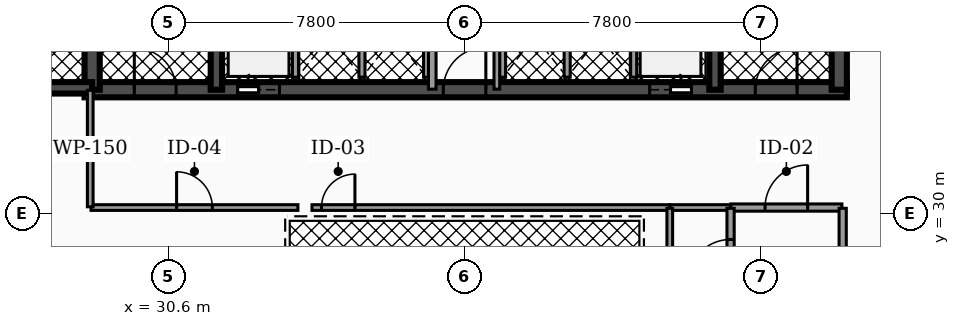
"""IFC4 building model, lengths in metres.
Left out: names, types, materials, properties, quantities, classifications, styles, units other than length and angle.
Written with IfcOpenShell. Run it as: python <this file> out.ifc"""

import sys

from ifc_helpers import new_model, si_unit, direction, frame, frame_2d, origin, place, context, subcontext, project, spatial, rectangle, extrude, element, fill, save


model = new_model("IFC4")
c1 = context("Model", 3, precision=1e-05, world=origin(), true_north=direction((0.0, 1.0)))
c2 = subcontext(c1, "Body", "Model", "MODEL_VIEW")
j1 = project(units=[si_unit("LENGTHUNIT", "METRE"), si_unit("PLANEANGLEUNIT", "RADIAN")], contexts=[c1])
p1 = place(None, origin())
s1 = spatial("IfcSite", under=j1, at=p1, CompositionType="ELEMENT")
p2 = place(p1, origin())
s2 = spatial("IfcBuilding", under=s1, at=p2, CompositionType="ELEMENT")
p3 = place(p2, frame((0.0, 0.0, 84.66)))
s3 = spatial("IfcBuildingStorey", under=s2, at=p3, CompositionType="ELEMENT", Elevation=84.66)
p4 = place(p3, frame((28.4, 33.25, 0.0), z_axis=(0.0, 0.0, 1.0), x_axis=(1.0, 0.0, 0.0)))
e1 = element("IfcWall", 1, at=p4, inside=s3, PredefinedType="SHEAR", context=c2, shape_type="SweptSolid", body=[
    extrude(rectangle(XDim=20.06, YDim=0.4, at=frame_2d((10.03, 0.0))), origin(), (0.0, 0.0, 1.0), 3.82),
])
p5 = place(p4, frame((4.03, 0.0, 0.0)))
e2 = element("IfcOpeningElement", 2, at=p5, cuts=e1, PredefinedType="OPENING", context=c2, shape_type="SweptSolid", body=[
    extrude(rectangle(XDim=1.1, YDim=2.15, at=frame_2d((0.55, 1.075))), frame((0.0, 0.21, 0.0), z_axis=(0.0, -1.0, 0.0), x_axis=(1.0, 0.0, 0.0)), (0.0, 0.0, 1.0), 0.42),
])
p6 = place(p4, frame((14.87, 0.0, 0.0)))
e3 = element("IfcOpeningElement", 3, at=p6, cuts=e1, PredefinedType="OPENING", context=c2, shape_type="SweptSolid", body=[
    extrude(rectangle(XDim=1.1, YDim=2.15, at=frame_2d((0.55, 1.075))), frame((0.0, 0.21, 0.0), z_axis=(0.0, -1.0, 0.0), x_axis=(1.0, 0.0, 0.0)), (0.0, 0.0, 1.0), 0.42),
])
p7 = place(p4, frame((1.31, 0.0, 0.0)))
e4 = element("IfcOpeningElement", 4, at=p7, cuts=e1, PredefinedType="OPENING", context=c2, shape_type="SweptSolid", body=[
    extrude(rectangle(XDim=1.1, YDim=2.2, at=frame_2d((0.55, 1.1))), frame((0.0, 0.21, 0.0), z_axis=(0.0, -1.0, 0.0), x_axis=(1.0, 0.0, 0.0)), (0.0, 0.0, 1.0), 0.42),
])
p8 = place(p4, frame((9.44, 0.0, 0.0)))
e5 = element("IfcOpeningElement", 5, at=p8, cuts=e1, PredefinedType="OPENING", context=c2, shape_type="SweptSolid", body=[
    extrude(rectangle(XDim=1.12, YDim=2.05, at=frame_2d((0.56, 1.025))), frame((0.0, 0.21, 0.0), z_axis=(0.0, -1.0, 0.0), x_axis=(1.0, 0.0, 0.0)), (0.0, 0.0, 1.0), 0.42),
])
p9 = place(p4, frame((17.65, 0.0, 0.0)))
e6 = element("IfcOpeningElement", 6, at=p9, cuts=e1, PredefinedType="OPENING", context=c2, shape_type="SweptSolid", body=[
    extrude(rectangle(XDim=1.1, YDim=2.2, at=frame_2d((0.55, 1.1))), frame((0.0, 0.21, 0.0), z_axis=(0.0, -1.0, 0.0), x_axis=(1.0, 0.0, 0.0)), (0.0, 0.0, 1.0), 0.42),
])
p10 = place(p3, frame((28.6, 33.25, 0.0), z_axis=(0.0, 0.0, 1.0), x_axis=(0.0, 1.0, 0.0)))
e7 = element("IfcWall", 7, at=p10, inside=s3, PredefinedType="SHEAR", context=c2, shape_type="SweptSolid", body=[
    extrude(rectangle(XDim=10.2, YDim=0.4, at=frame_2d((5.1, 0.0))), origin(), (0.0, 0.0, 1.0), 3.82),
])
for number, where, z_axis, x_axis in (
    (8, (31.87, 33.25, 0.0), (0.0, 0.0, 1.0), (0.0, 1.0, 0.0)),
    (9, (44.99, 33.25, 0.0), (0.0, 0.0, 1.0), (0.0, 1.0, 0.0)),
):
    element("IfcWall", number, at=place(p3, frame(where, z_axis=z_axis, x_axis=x_axis)), inside=s3, PredefinedType="SHEAR", context=c2, shape_type="SweptSolid", body=[
        extrude(rectangle(XDim=10.2, YDim=0.3, at=frame_2d((5.1, 0.0))), origin(), (0.0, 0.0, 1.0), 3.82),
    ])
p11 = place(p3, frame((48.26, 33.25, 0.0), z_axis=(0.0, 0.0, 1.0), x_axis=(0.0, 1.0, 0.0)))
e10 = element("IfcWall", 10, at=p11, inside=s3, PredefinedType="SHEAR", context=c2, shape_type="SweptSolid", body=[
    extrude(rectangle(XDim=10.2, YDim=0.4, at=frame_2d((5.1, 0.0))), origin(), (0.0, 0.0, 1.0), 3.82),
])
p12 = place(p3, frame((25.08, 33.3, 0.0), z_axis=(0.0, 0.0, 1.0), x_axis=(1.0, 0.0, 0.0)))
e11 = element("IfcWall", 11, at=p12, inside=s3, PredefinedType="SHEAR", context=c2, shape_type="SweptSolid", body=[
    extrude(rectangle(XDim=3.52, YDim=0.3, at=frame_2d((1.76, 0.0))), origin(), (0.0, 0.0, 1.0), 3.82),
])
p13 = place(p12, frame((1.335, 0.0, 0.0)))
e12 = element("IfcOpeningElement", 12, at=p13, cuts=e11, PredefinedType="OPENING", context=c2, shape_type="SweptSolid", body=[
    extrude(rectangle(XDim=0.95, YDim=2.2, at=frame_2d((0.475, 1.1))), frame((0.0, 0.16, 0.0), z_axis=(0.0, -1.0, 0.0), x_axis=(1.0, 0.0, 0.0)), (0.0, 0.0, 1.0), 0.32),
])
for number, where, z_axis, x_axis in (
    (13, (33.95, 33.58, 0.0), (0.0, 0.0, 1.0), (0.0, 1.0, 0.0)),
    (14, (42.85, 33.58, 0.0), (0.0, 0.0, 1.0), (0.0, 1.0, 0.0)),
):
    element("IfcWall", number, at=place(p3, frame(where, z_axis=z_axis, x_axis=x_axis)), inside=s3, PredefinedType="SOLIDWALL", context=c2, shape_type="SweptSolid", body=[
        extrude(rectangle(XDim=2.45, YDim=0.16, at=frame_2d((1.225, 0.0))), origin(), (0.0, 0.0, 1.0), 2.792),
    ])
for number, where, z_axis, x_axis in (
    (15, (35.7, 33.58, 0.0), (0.0, 0.0, 1.0), (0.0, 1.0, 0.0)),
    (16, (37.4, 33.58, 0.0), (0.0, 0.0, 1.0), (0.0, 1.0, 0.0)),
    (17, (39.4, 33.58, 0.0), (0.0, 0.0, 1.0), (0.0, 1.0, 0.0)),
    (18, (41.1, 33.58, 0.0), (0.0, 0.0, 1.0), (0.0, 1.0, 0.0)),
):
    element("IfcWall", number, at=place(p3, frame(where, z_axis=z_axis, x_axis=x_axis)), inside=s3, PredefinedType="SOLIDWALL", context=c2, shape_type="SweptSolid", body=[
        extrude(rectangle(XDim=2.25, YDim=0.16, at=frame_2d((1.125, 0.0))), origin(), (0.0, 0.0, 1.0), 2.792),
    ])
p14 = place(p3, frame((37.55, 33.265, 0.0), z_axis=(0.0, 0.0, 1.0), x_axis=(0.0, 1.0, 0.0)))
e19 = element("IfcWall", 19, at=p14, inside=s3, PredefinedType="PARTITIONING", context=c2, shape_type="SweptSolid", body=[
    extrude(rectangle(XDim=4.595, YDim=0.2, at=frame_2d((2.298, 0.0))), origin(), (0.0, 0.0, 1.0), 2.777),
])
p15 = place(p14, frame((3.058, 0.0, 0.0)))
e20 = element("IfcOpeningElement", 20, at=p15, cuts=e19, PredefinedType="OPENING", context=c2, shape_type="SweptSolid", body=[
    extrude(rectangle(XDim=0.88, YDim=2.05, at=frame_2d((0.44, 1.025))), frame((0.0, 0.11, 0.0), z_axis=(0.0, -1.0, 0.0), x_axis=(1.0, 0.0, 0.0)), (0.0, 0.0, 1.0), 0.22),
])
p16 = place(p3, frame((39.25, 33.265, 0.0), z_axis=(0.0, 0.0, 1.0), x_axis=(0.0, 1.0, 0.0)))
e21 = element("IfcWall", 21, at=p16, inside=s3, PredefinedType="PARTITIONING", context=c2, shape_type="SweptSolid", body=[
    extrude(rectangle(XDim=4.595, YDim=0.15, at=frame_2d((2.298, 0.0))), origin(), (0.0, 0.0, 1.0), 2.777),
])
p17 = place(p16, frame((3.028, 0.0, 0.0)))
e22 = element("IfcOpeningElement", 22, at=p17, cuts=e21, PredefinedType="OPENING", context=c2, shape_type="SweptSolid", body=[
    extrude(rectangle(XDim=0.94, YDim=2.05, at=frame_2d((0.47, 1.025))), frame((0.0, 0.085, 0.0), z_axis=(0.0, -1.0, 0.0), x_axis=(1.0, 0.0, 0.0)), (0.0, 0.0, 1.0), 0.17),
])
p18 = place(p3, frame((45.405, 30.15, 0.0), z_axis=(0.0, 0.0, 1.0), x_axis=(1.0, 0.0, 0.0)))
e23 = element("IfcWall", 23, at=p18, inside=s3, PredefinedType="PARTITIONING", context=c2, shape_type="SweptSolid", body=[
    extrude(rectangle(XDim=2.925, YDim=0.19, at=frame_2d((1.462, 0.0))), origin(), (0.0, 0.0, 1.0), 2.777),
])
p19 = place(p18, frame((0.903, 0.0, 0.0)))
e24 = element("IfcOpeningElement", 24, at=p19, cuts=e23, PredefinedType="OPENING", context=c2, shape_type="SweptSolid", body=[
    extrude(rectangle(XDim=1.12, YDim=2.05, at=frame_2d((0.56, 1.025))), frame((0.0, 0.105, 0.0), z_axis=(0.0, -1.0, 0.0), x_axis=(1.0, 0.0, 0.0)), (0.0, 0.0, 1.0), 0.21),
])
p20 = place(p3, frame((43.805, 30.15, 0.0), z_axis=(0.0, 0.0, 1.0), x_axis=(1.0, 0.0, 0.0)))
e25 = element("IfcWall", 25, at=p20, inside=s3, PredefinedType="PARTITIONING", context=c2, shape_type="SweptSolid", body=[
    extrude(rectangle(XDim=1.59, YDim=0.15, at=frame_2d((0.795, 0.0))), origin(), (0.0, 0.0, 1.0), 2.777),
])
p21 = place(p3, frame((28.57, 30.15, 0.0), z_axis=(0.0, 0.0, 1.0), x_axis=(1.0, 0.0, 0.0)))
e26 = element("IfcWall", 26, at=p21, inside=s3, PredefinedType="PARTITIONING", context=c2, shape_type="SweptSolid", body=[
    extrude(rectangle(XDim=5.445, YDim=0.15, at=frame_2d((2.722, 0.0))), origin(), (0.0, 0.0, 1.0), 2.777),
])
p22 = place(p21, frame((2.252, 0.0, 0.0)))
e27 = element("IfcOpeningElement", 27, at=p22, cuts=e26, PredefinedType="OPENING", context=c2, shape_type="SweptSolid", body=[
    extrude(rectangle(XDim=0.94, YDim=2.05, at=frame_2d((0.47, 1.025))), frame((0.0, 0.085, 0.0), z_axis=(0.0, -1.0, 0.0), x_axis=(1.0, 0.0, 0.0)), (0.0, 0.0, 1.0), 0.17),
])
p23 = place(p3, frame((28.55, 30.17, 0.0), z_axis=(0.0, 0.0, 1.0), x_axis=(0.0, 1.0, 0.0)))
e28 = element("IfcWall", 28, at=p23, inside=s3, PredefinedType="PARTITIONING", context=c2, shape_type="SweptSolid", body=[
    extrude(rectangle(XDim=3.065, YDim=0.15, at=frame_2d((1.533, 0.0))), origin(), (0.0, 0.0, 1.0), 2.777),
])
p24 = place(p3, frame((34.385, 30.15, 0.0), z_axis=(0.0, 0.0, 1.0), x_axis=(1.0, 0.0, 0.0)))
e29 = element("IfcWall", 29, at=p24, inside=s3, PredefinedType="PARTITIONING", context=c2, shape_type="SweptSolid", body=[
    extrude(rectangle(XDim=9.41, YDim=0.15, at=frame_2d((4.705, 0.0))), origin(), (0.0, 0.0, 1.0), 2.777),
])
p25 = place(p24, frame((0.25, 0.0, 0.0)))
e30 = element("IfcOpeningElement", 30, at=p25, cuts=e29, PredefinedType="OPENING", context=c2, shape_type="SweptSolid", body=[
    extrude(rectangle(XDim=0.88, YDim=2.05, at=frame_2d((0.44, 1.025))), frame((0.0, 0.085, 0.0), z_axis=(0.0, -1.0, 0.0), x_axis=(1.0, 0.0, 0.0)), (0.0, 0.0, 1.0), 0.17),
])
p26 = place(p3, frame((45.4, 27.37, 0.0), z_axis=(0.0, 0.0, 1.0), x_axis=(0.0, 1.0, 0.0)))
e31 = element("IfcWall", 31, at=p26, inside=s3, PredefinedType="PARTITIONING", context=c2, shape_type="SweptSolid", body=[
    extrude(rectangle(XDim=2.76, YDim=0.19, at=frame_2d((1.38, 0.0))), origin(), (0.0, 0.0, 1.0), 2.777),
])
p27 = place(p26, frame((0.82, 0.0, 0.0)))
e32 = element("IfcOpeningElement", 32, at=p27, cuts=e31, PredefinedType="OPENING", context=c2, shape_type="SweptSolid", body=[
    extrude(rectangle(XDim=1.12, YDim=2.05, at=frame_2d((0.56, 1.025))), frame((0.0, 0.105, 0.0), z_axis=(0.0, -1.0, 0.0), x_axis=(1.0, 0.0, 0.0)), (0.0, 0.0, 1.0), 0.21),
])
p28 = place(p3, frame((48.35, 27.37, 0.0), z_axis=(0.0, 0.0, 1.0), x_axis=(0.0, 1.0, 0.0)))
e33 = element("IfcWall", 33, at=p28, inside=s3, PredefinedType="PARTITIONING", context=c2, shape_type="SweptSolid", body=[
    extrude(rectangle(XDim=2.76, YDim=0.19, at=frame_2d((1.38, 0.0))), origin(), (0.0, 0.0, 1.0), 2.777),
])
p29 = place(p3, frame((43.8, 23.62, 0.0), z_axis=(0.0, 0.0, 1.0), x_axis=(0.0, 1.0, 0.0)))
e34 = element("IfcWall", 34, at=p29, inside=s3, PredefinedType="PARTITIONING", context=c2, shape_type="SweptSolid", body=[
    extrude(rectangle(XDim=6.51, YDim=0.15, at=frame_2d((3.255, 0.0))), origin(), (0.0, 0.0, 1.0), 2.777),
])
p30 = place(p5, origin())
e35 = element("IfcDoor", 35, at=p30, inside=s3, OperationType="SLIDING_TO_LEFT", PredefinedType="DOOR", context=c2, shape_type="SweptSolid", body=[
    extrude(rectangle(XDim=1.1, YDim=2.15, at=frame_2d((0.55, 1.075))), frame((0.0, 0.025, 0.0), z_axis=(0.0, -1.0, 0.0), x_axis=(1.0, 0.0, 0.0)), (0.0, 0.0, 1.0), 0.05),
])
fill(e2, e35)
p31 = place(p6, origin())
e36 = element("IfcDoor", 36, at=p31, inside=s3, OperationType="SLIDING_TO_RIGHT", PredefinedType="DOOR", context=c2, shape_type="SweptSolid", body=[
    extrude(rectangle(XDim=1.1, YDim=2.15, at=frame_2d((0.55, 1.075))), frame((0.0, 0.025, 0.0), z_axis=(0.0, -1.0, 0.0), x_axis=(1.0, 0.0, 0.0)), (0.0, 0.0, 1.0), 0.05),
])
fill(e3, e36)
p32 = place(p7, origin())
e37 = element("IfcDoor", 37, at=p32, inside=s3, OperationType="SINGLE_SWING_LEFT", PredefinedType="DOOR", context=c2, shape_type="SweptSolid", body=[
    extrude(rectangle(XDim=1.1, YDim=2.2, at=frame_2d((0.55, 1.1))), frame((0.0, 0.025, 0.0), z_axis=(0.0, -1.0, 0.0), x_axis=(1.0, 0.0, 0.0)), (0.0, 0.0, 1.0), 0.05),
])
fill(e4, e37)
p33 = place(p8, origin())
e38 = element("IfcDoor", 38, at=p33, inside=s3, OperationType="SINGLE_SWING_RIGHT", PredefinedType="DOOR", context=c2, shape_type="SweptSolid", body=[
    extrude(rectangle(XDim=1.12, YDim=2.05, at=frame_2d((0.56, 1.025))), frame((0.0, 0.025, 0.0), z_axis=(0.0, -1.0, 0.0), x_axis=(1.0, 0.0, 0.0)), (0.0, 0.0, 1.0), 0.05),
])
fill(e5, e38)
p34 = place(p9, origin())
e39 = element("IfcDoor", 39, at=p34, inside=s3, OperationType="SINGLE_SWING_RIGHT", PredefinedType="DOOR", context=c2, shape_type="SweptSolid", body=[
    extrude(rectangle(XDim=1.1, YDim=2.2, at=frame_2d((0.55, 1.1))), frame((0.0, 0.025, 0.0), z_axis=(0.0, -1.0, 0.0), x_axis=(1.0, 0.0, 0.0)), (0.0, 0.0, 1.0), 0.05),
])
fill(e6, e39)
p35 = place(p19, origin())
e40 = element("IfcDoor", 40, at=p35, inside=s3, OperationType="SINGLE_SWING_RIGHT", PredefinedType="DOOR", context=c2, shape_type="SweptSolid", body=[
    extrude(rectangle(XDim=1.12, YDim=2.05, at=frame_2d((0.56, 1.025))), frame((0.0, 0.025, 0.0), z_axis=(0.0, -1.0, 0.0), x_axis=(1.0, 0.0, 0.0)), (0.0, 0.0, 1.0), 0.05),
])
fill(e24, e40)
p36 = place(p22, origin())
e41 = element("IfcDoor", 41, at=p36, inside=s3, OperationType="SINGLE_SWING_LEFT", PredefinedType="DOOR", context=c2, shape_type="SweptSolid", body=[
    extrude(rectangle(XDim=0.94, YDim=2.05, at=frame_2d((0.47, 1.025))), frame((0.0, 0.025, 0.0), z_axis=(0.0, -1.0, 0.0), x_axis=(1.0, 0.0, 0.0)), (0.0, 0.0, 1.0), 0.05),
])
fill(e27, e41)
p37 = place(p25, origin())
e42 = element("IfcDoor", 42, at=p37, inside=s3, OperationType="SINGLE_SWING_RIGHT", PredefinedType="DOOR", context=c2, shape_type="SweptSolid", body=[
    extrude(rectangle(XDim=0.88, YDim=2.05, at=frame_2d((0.44, 1.025))), frame((0.0, 0.025, 0.0), z_axis=(0.0, -1.0, 0.0), x_axis=(1.0, 0.0, 0.0)), (0.0, 0.0, 1.0), 0.05),
])
fill(e30, e42)
p38 = place(p27, origin())
e43 = element("IfcDoor", 43, at=p38, inside=s3, OperationType="SINGLE_SWING_LEFT", PredefinedType="DOOR", context=c2, shape_type="SweptSolid", body=[
    extrude(rectangle(XDim=1.12, YDim=2.05, at=frame_2d((0.56, 1.025))), frame((0.0, 0.025, 0.0), z_axis=(0.0, -1.0, 0.0), x_axis=(1.0, 0.0, 0.0)), (0.0, 0.0, 1.0), 0.05),
])
fill(e32, e43)
save(model, sys.argv[1])
